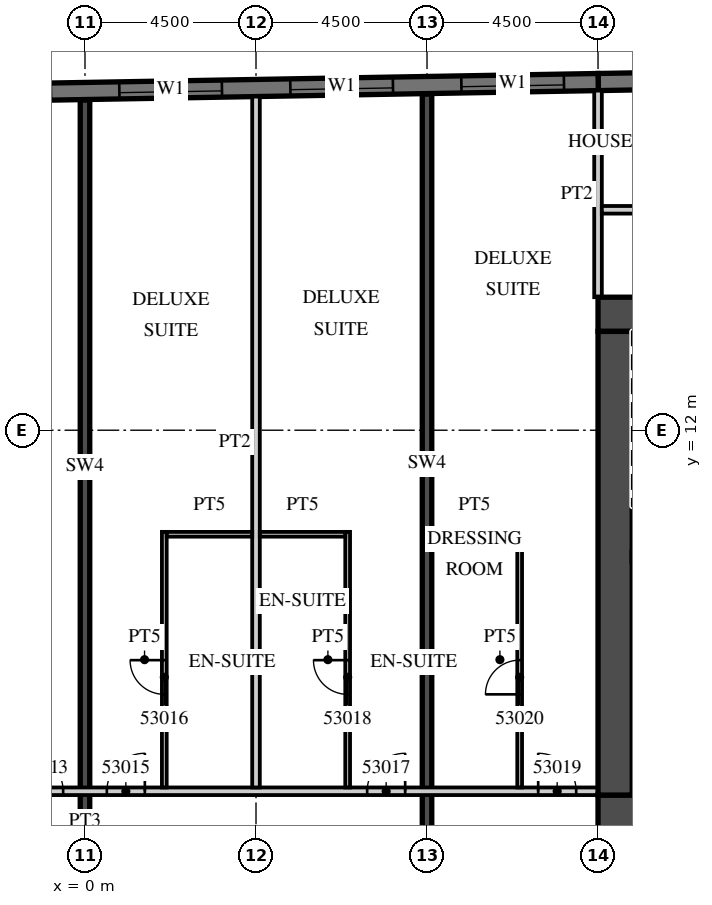
"""IFC4 building model, lengths in metres.
Left out: names, types, materials, properties, quantities, classifications, styles, units other than length and angle.
Written with IfcOpenShell. Run it as: python <this file> out.ifc"""

import sys

from ifc_helpers import new_model, si_unit, direction, frame, frame_2d, origin, place, context, subcontext, project, spatial, rectangle, extrude, element, fill, save


model = new_model("IFC4")
c1 = context("Model", 3, precision=1e-05, world=origin(), true_north=direction((0.0, 1.0)))
c2 = subcontext(c1, "Body", "Model", "MODEL_VIEW")
j1 = project(units=[si_unit("LENGTHUNIT", "METRE"), si_unit("PLANEANGLEUNIT", "RADIAN")], contexts=[c1])
p1 = place(None, origin())
s1 = spatial("IfcSite", under=j1, at=p1, CompositionType="ELEMENT")
p2 = place(p1, origin())
s2 = spatial("IfcBuilding", under=s1, at=p2, CompositionType="ELEMENT")
p3 = place(p2, frame((0.0, 0.0, 221.0)))
s3 = spatial("IfcBuildingStorey", under=s2, at=p3, CompositionType="ELEMENT", Elevation=221.0)
p4 = place(p3, frame((0.0, 1.4, 0.0), z_axis=(0.0, 0.0, 1.0), x_axis=(0.0, 1.0, 0.0)))
e1 = element("IfcWall", 1, at=p4, inside=s3, PredefinedType="SHEAR", context=c2, shape_type="SweptSolid", body=[
    extrude(rectangle(XDim=19.289, YDim=0.25, at=frame_2d((9.644, 0.0))), origin(), (0.0, 0.0, 1.0), 3.3),
])
p5 = place(p3, frame((9.0, 1.4, 0.0), z_axis=(0.0, 0.0, 1.0), x_axis=(0.0, 1.0, 0.0)))
e2 = element("IfcWall", 2, at=p5, inside=s3, PredefinedType="SHEAR", context=c2, shape_type="SweptSolid", body=[
    extrude(rectangle(XDim=19.446, YDim=0.25, at=frame_2d((9.723, 0.0))), origin(), (0.0, 0.0, 1.0), 3.3),
])
p6 = place(p3, frame((31.504, 21.476, 0.0), z_axis=(0.0, 0.0, 1.0), x_axis=(-0.999847677887, -0.017453395744, 0.0)))
e3 = element("IfcWall", 3, at=p6, inside=s3, PredefinedType="SOLIDWALL", context=c2, shape_type="SweptSolid", body=[
    extrude(rectangle(XDim=18.003, YDim=0.45, at=frame_2d((9.001, 0.0))), origin(), (0.0, 0.0, 1.0), 3.02),
])
p7 = place(p3, frame((13.504, 21.161, 0.0), z_axis=(0.0, 0.0, 1.0), x_axis=(-0.999847763257, -0.017448504532, 0.0)))
e4 = element("IfcWall", 4, at=p7, inside=s3, PredefinedType="SOLIDWALL", context=c2, shape_type="SweptSolid", body=[
    extrude(rectangle(XDim=46.859, YDim=0.45, at=frame_2d((23.43, 0.0))), origin(), (0.0, 0.0, 1.0), 3.02),
])
p8 = place(p7, frame((0.9, 0.0, 0.45)))
e5 = element("IfcOpeningElement", 5, at=p8, cuts=e4, PredefinedType="OPENING", context=c2, shape_type="SweptSolid", body=[
    extrude(rectangle(XDim=2.7, YDim=2.25, at=frame_2d((1.35, 1.125))), frame((0.0, 0.235, 0.0), z_axis=(0.0, -1.0, 0.0), x_axis=(1.0, 0.0, 0.0)), (0.0, 0.0, 1.0), 0.47),
])
p9 = place(p7, frame((5.401, 0.0, 0.45)))
e6 = element("IfcOpeningElement", 6, at=p9, cuts=e4, PredefinedType="OPENING", context=c2, shape_type="SweptSolid", body=[
    extrude(rectangle(XDim=2.7, YDim=2.25, at=frame_2d((1.35, 1.125))), frame((0.0, 0.235, 0.0), z_axis=(0.0, -1.0, 0.0), x_axis=(1.0, 0.0, 0.0)), (0.0, 0.0, 1.0), 0.47),
])
p10 = place(p7, frame((9.902, 0.0, 0.45)))
e7 = element("IfcOpeningElement", 7, at=p10, cuts=e4, PredefinedType="OPENING", context=c2, shape_type="SweptSolid", body=[
    extrude(rectangle(XDim=2.7, YDim=2.25, at=frame_2d((1.35, 1.125))), frame((0.0, 0.235, 0.0), z_axis=(0.0, -1.0, 0.0), x_axis=(1.0, 0.0, 0.0)), (0.0, 0.0, 1.0), 0.47),
])
p11 = place(p7, frame((14.402, 0.0, 0.45)))
e8 = element("IfcOpeningElement", 8, at=p11, cuts=e4, PredefinedType="OPENING", context=c2, shape_type="SweptSolid", body=[
    extrude(rectangle(XDim=2.7, YDim=2.25, at=frame_2d((1.35, 1.125))), frame((0.0, 0.235, 0.0), z_axis=(0.0, -1.0, 0.0), x_axis=(1.0, 0.0, 0.0)), (0.0, 0.0, 1.0), 0.47),
])
p12 = place(p7, frame((18.903, 0.0, 0.45)))
e9 = element("IfcOpeningElement", 9, at=p12, cuts=e4, PredefinedType="OPENING", context=c2, shape_type="SweptSolid", body=[
    extrude(rectangle(XDim=2.7, YDim=2.25, at=frame_2d((1.35, 1.125))), frame((0.0, 0.235, 0.0), z_axis=(0.0, -1.0, 0.0), x_axis=(1.0, 0.0, 0.0)), (0.0, 0.0, 1.0), 0.47),
])
p13 = place(p7, frame((23.404, 0.0, 0.45)))
e10 = element("IfcOpeningElement", 10, at=p13, cuts=e4, PredefinedType="OPENING", context=c2, shape_type="SweptSolid", body=[
    extrude(rectangle(XDim=2.7, YDim=2.25, at=frame_2d((1.35, 1.125))), frame((0.0, 0.235, 0.0), z_axis=(0.0, -1.0, 0.0), x_axis=(1.0, 0.0, 0.0)), (0.0, 0.0, 1.0), 0.47),
])
p14 = place(p7, frame((27.904, 0.0, 0.45)))
e11 = element("IfcOpeningElement", 11, at=p14, cuts=e4, PredefinedType="OPENING", context=c2, shape_type="SweptSolid", body=[
    extrude(rectangle(XDim=2.7, YDim=2.25, at=frame_2d((1.35, 1.125))), frame((0.0, 0.235, 0.0), z_axis=(0.0, -1.0, 0.0), x_axis=(1.0, 0.0, 0.0)), (0.0, 0.0, 1.0), 0.47),
])
p15 = place(p7, frame((32.405, 0.0, 0.45)))
e12 = element("IfcOpeningElement", 12, at=p15, cuts=e4, PredefinedType="OPENING", context=c2, shape_type="SweptSolid", body=[
    extrude(rectangle(XDim=2.7, YDim=2.25, at=frame_2d((1.35, 1.125))), frame((0.0, 0.235, 0.0), z_axis=(0.0, -1.0, 0.0), x_axis=(1.0, 0.0, 0.0)), (0.0, 0.0, 1.0), 0.47),
])
p16 = place(p7, frame((36.906, 0.0, 0.45)))
e13 = element("IfcOpeningElement", 13, at=p16, cuts=e4, PredefinedType="OPENING", context=c2, shape_type="SweptSolid", body=[
    extrude(rectangle(XDim=2.7, YDim=2.25, at=frame_2d((1.35, 1.125))), frame((0.0, 0.235, 0.0), z_axis=(0.0, -1.0, 0.0), x_axis=(1.0, 0.0, 0.0)), (0.0, 0.0, 1.0), 0.47),
])
p17 = place(p7, frame((41.406, 0.0, 0.45)))
e14 = element("IfcOpeningElement", 14, at=p17, cuts=e4, PredefinedType="OPENING", context=c2, shape_type="SweptSolid", body=[
    extrude(rectangle(XDim=2.7, YDim=2.25, at=frame_2d((1.35, 1.125))), frame((0.0, 0.235, 0.0), z_axis=(0.0, -1.0, 0.0), x_axis=(1.0, 0.0, 0.0)), (0.0, 0.0, 1.0), 0.47),
])
p18 = place(p3, frame((13.5, 15.5, 0.0), z_axis=(0.0, 0.0, 1.0), x_axis=(0.0, 1.0, 0.0)))
e15 = element("IfcWall", 15, at=p18, inside=s3, PredefinedType="PARTITIONING", context=c2, shape_type="SweptSolid", body=[
    extrude(rectangle(XDim=5.436, YDim=0.2, at=frame_2d((2.718, 0.0))), origin(), (0.0, 0.0, 1.0), 3.02),
])
p19 = place(p3, frame((-13.5, 2.5, 0.0), z_axis=(0.0, 0.0, 1.0), x_axis=(1.0, 0.0, 0.0)))
e16 = element("IfcWall", 16, at=p19, inside=s3, PredefinedType="PARTITIONING", context=c2, shape_type="SweptSolid", body=[
    extrude(rectangle(XDim=27.0, YDim=0.2, at=frame_2d((13.5, 0.0))), origin(), (0.0, 0.0, 1.0), 3.02),
])
p20 = place(p19, frame((2.925, 0.0, 0.0)))
e17 = element("IfcOpeningElement", 17, at=p20, cuts=e16, PredefinedType="OPENING", context=c2, shape_type="SweptSolid", body=[
    extrude(rectangle(XDim=1.0, YDim=2.1, at=frame_2d((0.5, 1.05))), frame((0.0, 0.11, 0.0), z_axis=(0.0, -1.0, 0.0), x_axis=(1.0, 0.0, 0.0)), (0.0, 0.0, 1.0), 0.22),
])
p21 = place(p19, frame((7.45, 0.0, 0.0)))
e18 = element("IfcOpeningElement", 18, at=p21, cuts=e16, PredefinedType="OPENING", context=c2, shape_type="SweptSolid", body=[
    extrude(rectangle(XDim=1.0, YDim=2.1, at=frame_2d((0.5, 1.05))), frame((0.0, 0.11, 0.0), z_axis=(0.0, -1.0, 0.0), x_axis=(1.0, 0.0, 0.0)), (0.0, 0.0, 1.0), 0.22),
])
p22 = place(p19, frame((11.925, 0.0, 0.0)))
e19 = element("IfcOpeningElement", 19, at=p22, cuts=e16, PredefinedType="OPENING", context=c2, shape_type="SweptSolid", body=[
    extrude(rectangle(XDim=1.0, YDim=2.1, at=frame_2d((0.5, 1.05))), frame((0.0, 0.11, 0.0), z_axis=(0.0, -1.0, 0.0), x_axis=(1.0, 0.0, 0.0)), (0.0, 0.0, 1.0), 0.22),
])
p23 = place(p19, frame((14.075, 0.0, 0.0)))
e20 = element("IfcOpeningElement", 20, at=p23, cuts=e16, PredefinedType="OPENING", context=c2, shape_type="SweptSolid", body=[
    extrude(rectangle(XDim=1.0, YDim=2.1, at=frame_2d((0.5, 1.05))), frame((0.0, 0.11, 0.0), z_axis=(0.0, -1.0, 0.0), x_axis=(1.0, 0.0, 0.0)), (0.0, 0.0, 1.0), 0.22),
])
p24 = place(p19, frame((20.925, 0.0, 0.0)))
e21 = element("IfcOpeningElement", 21, at=p24, cuts=e16, PredefinedType="OPENING", context=c2, shape_type="SweptSolid", body=[
    extrude(rectangle(XDim=1.0, YDim=2.1, at=frame_2d((0.5, 1.05))), frame((0.0, 0.11, 0.0), z_axis=(0.0, -1.0, 0.0), x_axis=(1.0, 0.0, 0.0)), (0.0, 0.0, 1.0), 0.22),
])
p25 = place(p19, frame((25.425, 0.0, 0.0)))
e22 = element("IfcOpeningElement", 22, at=p25, cuts=e16, PredefinedType="OPENING", context=c2, shape_type="SweptSolid", body=[
    extrude(rectangle(XDim=1.0, YDim=2.1, at=frame_2d((0.5, 1.05))), frame((0.0, 0.11, 0.0), z_axis=(0.0, -1.0, 0.0), x_axis=(1.0, 0.0, 0.0)), (0.0, 0.0, 1.0), 0.22),
])
p26 = place(p3, frame((4.5, 2.6, 0.0), z_axis=(0.0, 0.0, 1.0), x_axis=(0.0, 1.0, 0.0)))
e23 = element("IfcWall", 23, at=p26, inside=s3, PredefinedType="PARTITIONING", context=c2, shape_type="SweptSolid", body=[
    extrude(rectangle(XDim=18.179, YDim=0.2, at=frame_2d((9.089, 0.0))), origin(), (0.0, 0.0, 1.0), 3.02),
])
p27 = place(p3, frame((2.087, 2.6, 0.0), z_axis=(0.0, 0.0, 1.0), x_axis=(0.0, 1.0, 0.0)))
e24 = element("IfcWall", 24, at=p27, inside=s3, PredefinedType="PARTITIONING", context=c2, shape_type="SweptSolid", body=[
    extrude(rectangle(XDim=6.725, YDim=0.125, at=frame_2d((3.362, 0.0))), origin(), (0.0, 0.0, 1.0), 3.02),
])
p28 = place(p27, frame((2.45, 0.0, 0.0)))
e25 = element("IfcOpeningElement", 25, at=p28, cuts=e24, PredefinedType="OPENING", context=c2, shape_type="SweptSolid", body=[
    extrude(rectangle(XDim=0.9, YDim=2.1, at=frame_2d((0.45, 1.05))), frame((0.0, 0.073, 0.0), z_axis=(0.0, -1.0, 0.0), x_axis=(1.0, 0.0, 0.0)), (0.0, 0.0, 1.0), 0.145),
])
p29 = place(p3, frame((2.15, 9.262, 0.0), z_axis=(0.0, 0.0, 1.0), x_axis=(1.0, 0.0, 0.0)))
e26 = element("IfcWall", 26, at=p29, inside=s3, PredefinedType="PARTITIONING", context=c2, shape_type="SweptSolid", body=[
    extrude(rectangle(XDim=2.25, YDim=0.125, at=frame_2d((1.125, 0.0))), origin(), (0.0, 0.0, 1.0), 3.02),
])
p30 = place(p3, frame((6.912, 2.6, 0.0), z_axis=(0.0, 0.0, 1.0), x_axis=(0.0, 1.0, 0.0)))
e27 = element("IfcWall", 27, at=p30, inside=s3, PredefinedType="PARTITIONING", context=c2, shape_type="SweptSolid", body=[
    extrude(rectangle(XDim=6.725, YDim=0.125, at=frame_2d((3.362, 0.0))), origin(), (0.0, 0.0, 1.0), 3.02),
])
p31 = place(p30, frame((2.45, 0.0, 0.0)))
e28 = element("IfcOpeningElement", 28, at=p31, cuts=e27, PredefinedType="OPENING", context=c2, shape_type="SweptSolid", body=[
    extrude(rectangle(XDim=0.9, YDim=2.1, at=frame_2d((0.45, 1.05))), frame((0.0, 0.073, 0.0), z_axis=(0.0, -1.0, 0.0), x_axis=(1.0, 0.0, 0.0)), (0.0, 0.0, 1.0), 0.145),
])
p32 = place(p3, frame((4.6, 9.262, 0.0), z_axis=(0.0, 0.0, 1.0), x_axis=(1.0, 0.0, 0.0)))
e29 = element("IfcWall", 29, at=p32, inside=s3, PredefinedType="PARTITIONING", context=c2, shape_type="SweptSolid", body=[
    extrude(rectangle(XDim=2.25, YDim=0.125, at=frame_2d((1.125, 0.0))), origin(), (0.0, 0.0, 1.0), 3.02),
])
p33 = place(p3, frame((11.438, 2.6, 0.0), z_axis=(0.0, 0.0, 1.0), x_axis=(0.0, 1.0, 0.0)))
e30 = element("IfcWall", 30, at=p33, inside=s3, PredefinedType="PARTITIONING", context=c2, shape_type="SweptSolid", body=[
    extrude(rectangle(XDim=6.725, YDim=0.125, at=frame_2d((3.362, 0.0))), origin(), (0.0, 0.0, 1.0), 3.02),
])
p34 = place(p33, frame((2.45, 0.0, 0.0)))
e31 = element("IfcOpeningElement", 31, at=p34, cuts=e30, PredefinedType="OPENING", context=c2, shape_type="SweptSolid", body=[
    extrude(rectangle(XDim=0.9, YDim=2.1, at=frame_2d((0.45, 1.05))), frame((0.0, 0.073, 0.0), z_axis=(0.0, -1.0, 0.0), x_axis=(1.0, 0.0, 0.0)), (0.0, 0.0, 1.0), 0.145),
])
p35 = place(p3, frame((9.125, 9.262, 0.0), z_axis=(0.0, 0.0, 1.0), x_axis=(1.0, 0.0, 0.0)))
e32 = element("IfcWall", 32, at=p35, inside=s3, PredefinedType="PARTITIONING", context=c2, shape_type="SweptSolid", body=[
    extrude(rectangle(XDim=2.25, YDim=0.125, at=frame_2d((1.125, 0.0))), origin(), (0.0, 0.0, 1.0), 3.02),
])
p36 = place(p3, frame((13.5, 1.95, 0.0), z_axis=(0.0, 0.0, 1.0), x_axis=(1.0, 0.0, 0.0)))
e33 = element("IfcWall", 33, at=p36, inside=s3, PredefinedType="SHEAR", context=c2, shape_type="SweptSolid", body=[
    extrude(rectangle(XDim=18.0, YDim=0.9, at=frame_2d((9.0, 0.0))), origin(), (0.0, 0.0, 1.0), 3.02),
])
p37 = place(p36, frame((1.475, 0.0, 0.0)))
e34 = element("IfcOpeningElement", 34, at=p37, cuts=e33, PredefinedType="OPENING", context=c2, shape_type="SweptSolid", body=[
    extrude(rectangle(XDim=1.8, YDim=2.1, at=frame_2d((0.9, 1.05))), frame((0.0, 0.46, 0.0), z_axis=(0.0, -1.0, 0.0), x_axis=(1.0, 0.0, 0.0)), (0.0, 0.0, 1.0), 0.92),
])
p38 = place(p3, frame((13.5, 15.05, 0.0), z_axis=(0.0, 0.0, 1.0), x_axis=(1.0, 0.0, 0.0)))
e35 = element("IfcWall", 35, at=p38, inside=s3, PredefinedType="SHEAR", context=c2, shape_type="SweptSolid", body=[
    extrude(rectangle(XDim=6.8, YDim=0.9, at=frame_2d((3.4, 0.0))), origin(), (0.0, 0.0, 1.0), 3.02),
])
p39 = place(p38, frame((4.725, 0.0, 0.0)))
e36 = element("IfcOpeningElement", 36, at=p39, cuts=e35, PredefinedType="OPENING", context=c2, shape_type="SweptSolid", body=[
    extrude(rectangle(XDim=1.2, YDim=2.1, at=frame_2d((0.6, 1.05))), frame((0.0, 0.46, 0.0), z_axis=(0.0, -1.0, 0.0), x_axis=(1.0, 0.0, 0.0)), (0.0, 0.0, 1.0), 0.92),
])
p40 = place(p3, frame((13.95, 2.4, 0.0), z_axis=(0.0, 0.0, 1.0), x_axis=(0.0, 1.0, 0.0)))
e37 = element("IfcWall", 37, at=p40, inside=s3, PredefinedType="SHEAR", context=c2, shape_type="SweptSolid", body=[
    extrude(rectangle(XDim=12.2, YDim=0.9, at=frame_2d((6.1, 0.0))), origin(), (0.0, 0.0, 1.0), 3.02),
])
p41 = place(p3, frame((13.6, 17.8, 0.0), z_axis=(0.0, 0.0, 1.0), x_axis=(1.0, 0.0, 0.0)))
e38 = element("IfcWall", 38, at=p41, inside=s3, PredefinedType="PARTITIONING", context=c2, shape_type="SweptSolid", body=[
    extrude(rectangle(XDim=28.657, YDim=0.2, at=frame_2d((14.329, 0.0))), origin(), (0.0, 0.0, 1.0), 3.02),
])
p42 = place(p41, frame((17.812, 0.0, 0.0)))
e39 = element("IfcOpeningElement", 39, at=p42, cuts=e38, PredefinedType="OPENING", context=c2, shape_type="SweptSolid", body=[
    extrude(rectangle(XDim=0.9, YDim=2.1, at=frame_2d((0.45, 1.05))), frame((0.0, 0.11, 0.0), z_axis=(0.0, -1.0, 0.0), x_axis=(1.0, 0.0, 0.0)), (0.0, 0.0, 1.0), 0.22),
])
p43 = place(p41, frame((9.512, 0.0, 0.0)))
e40 = element("IfcOpeningElement", 40, at=p43, cuts=e38, PredefinedType="OPENING", context=c2, shape_type="SweptSolid", body=[
    extrude(rectangle(XDim=0.9, YDim=2.1, at=frame_2d((0.45, 1.05))), frame((0.0, 0.11, 0.0), z_axis=(0.0, -1.0, 0.0), x_axis=(1.0, 0.0, 0.0)), (0.0, 0.0, 1.0), 0.22),
])
p44 = place(p8, origin())
e41 = element("IfcWindow", 41, at=p44, inside=s3, PartitioningType="SINGLE_PANEL", PredefinedType="WINDOW", context=c2, shape_type="SweptSolid", body=[
    extrude(rectangle(XDim=2.7, YDim=2.25, at=frame_2d((1.35, 1.125))), frame((0.0, 0.09, 0.0), z_axis=(0.0, -1.0, 0.0), x_axis=(1.0, 0.0, 0.0)), (0.0, 0.0, 1.0), 0.06),
])
fill(e5, e41)
p45 = place(p9, origin())
e42 = element("IfcWindow", 42, at=p45, inside=s3, PartitioningType="SINGLE_PANEL", PredefinedType="WINDOW", context=c2, shape_type="SweptSolid", body=[
    extrude(rectangle(XDim=2.7, YDim=2.25, at=frame_2d((1.35, 1.125))), frame((0.0, 0.09, 0.0), z_axis=(0.0, -1.0, 0.0), x_axis=(1.0, 0.0, 0.0)), (0.0, 0.0, 1.0), 0.06),
])
fill(e6, e42)
p46 = place(p10, origin())
e43 = element("IfcWindow", 43, at=p46, inside=s3, PartitioningType="SINGLE_PANEL", PredefinedType="WINDOW", context=c2, shape_type="SweptSolid", body=[
    extrude(rectangle(XDim=2.7, YDim=2.25, at=frame_2d((1.35, 1.125))), frame((0.0, 0.09, 0.0), z_axis=(0.0, -1.0, 0.0), x_axis=(1.0, 0.0, 0.0)), (0.0, 0.0, 1.0), 0.06),
])
fill(e7, e43)
p47 = place(p22, origin())
e44 = element("IfcDoor", 44, at=p47, inside=s3, OperationType="SINGLE_SWING_LEFT", PredefinedType="DOOR", context=c2, shape_type="SweptSolid", body=[
    extrude(rectangle(XDim=1.0, YDim=2.1, at=frame_2d((0.5, 1.05))), frame((0.0, 0.025, 0.0), z_axis=(0.0, -1.0, 0.0), x_axis=(1.0, 0.0, 0.0)), (0.0, 0.0, 1.0), 0.05),
])
fill(e19, e44)
p48 = place(p23, origin())
e45 = element("IfcDoor", 45, at=p48, inside=s3, OperationType="SINGLE_SWING_RIGHT", PredefinedType="DOOR", context=c2, shape_type="SweptSolid", body=[
    extrude(rectangle(XDim=1.0, YDim=2.1, at=frame_2d((0.5, 1.05))), frame((0.0, 0.025, 0.0), z_axis=(0.0, -1.0, 0.0), x_axis=(1.0, 0.0, 0.0)), (0.0, 0.0, 1.0), 0.05),
])
fill(e20, e45)
p49 = place(p28, origin())
e46 = element("IfcDoor", 46, at=p49, inside=s3, OperationType="SINGLE_SWING_RIGHT", PredefinedType="DOOR", context=c2, shape_type="SweptSolid", body=[
    extrude(rectangle(XDim=0.9, YDim=2.1, at=frame_2d((0.45, 1.05))), frame((0.0, 0.025, 0.0), z_axis=(0.0, -1.0, 0.0), x_axis=(1.0, 0.0, 0.0)), (0.0, 0.0, 1.0), 0.05),
])
fill(e25, e46)
p50 = place(p24, origin())
e47 = element("IfcDoor", 47, at=p50, inside=s3, OperationType="SINGLE_SWING_RIGHT", PredefinedType="DOOR", context=c2, shape_type="SweptSolid", body=[
    extrude(rectangle(XDim=1.0, YDim=2.1, at=frame_2d((0.5, 1.05))), frame((0.0, 0.025, 0.0), z_axis=(0.0, -1.0, 0.0), x_axis=(1.0, 0.0, 0.0)), (0.0, 0.0, 1.0), 0.05),
])
fill(e21, e47)
p51 = place(p31, origin())
e48 = element("IfcDoor", 48, at=p51, inside=s3, OperationType="SINGLE_SWING_RIGHT", PredefinedType="DOOR", context=c2, shape_type="SweptSolid", body=[
    extrude(rectangle(XDim=0.9, YDim=2.1, at=frame_2d((0.45, 1.05))), frame((0.0, 0.025, 0.0), z_axis=(0.0, -1.0, 0.0), x_axis=(1.0, 0.0, 0.0)), (0.0, 0.0, 1.0), 0.05),
])
fill(e28, e48)
p52 = place(p25, origin())
e49 = element("IfcDoor", 49, at=p52, inside=s3, OperationType="SINGLE_SWING_LEFT", PredefinedType="DOOR", context=c2, shape_type="SweptSolid", body=[
    extrude(rectangle(XDim=1.0, YDim=2.1, at=frame_2d((0.5, 1.05))), frame((0.0, 0.025, 0.0), z_axis=(0.0, -1.0, 0.0), x_axis=(1.0, 0.0, 0.0)), (0.0, 0.0, 1.0), 0.05),
])
fill(e22, e49)
p53 = place(p34, origin())
e50 = element("IfcDoor", 50, at=p53, inside=s3, OperationType="SINGLE_SWING_LEFT", PredefinedType="DOOR", context=c2, shape_type="SweptSolid", body=[
    extrude(rectangle(XDim=0.9, YDim=2.1, at=frame_2d((0.45, 1.05))), frame((0.0, 0.025, 0.0), z_axis=(0.0, -1.0, 0.0), x_axis=(1.0, 0.0, 0.0)), (0.0, 0.0, 1.0), 0.05),
])
fill(e31, e50)
save(model, sys.argv[1])
